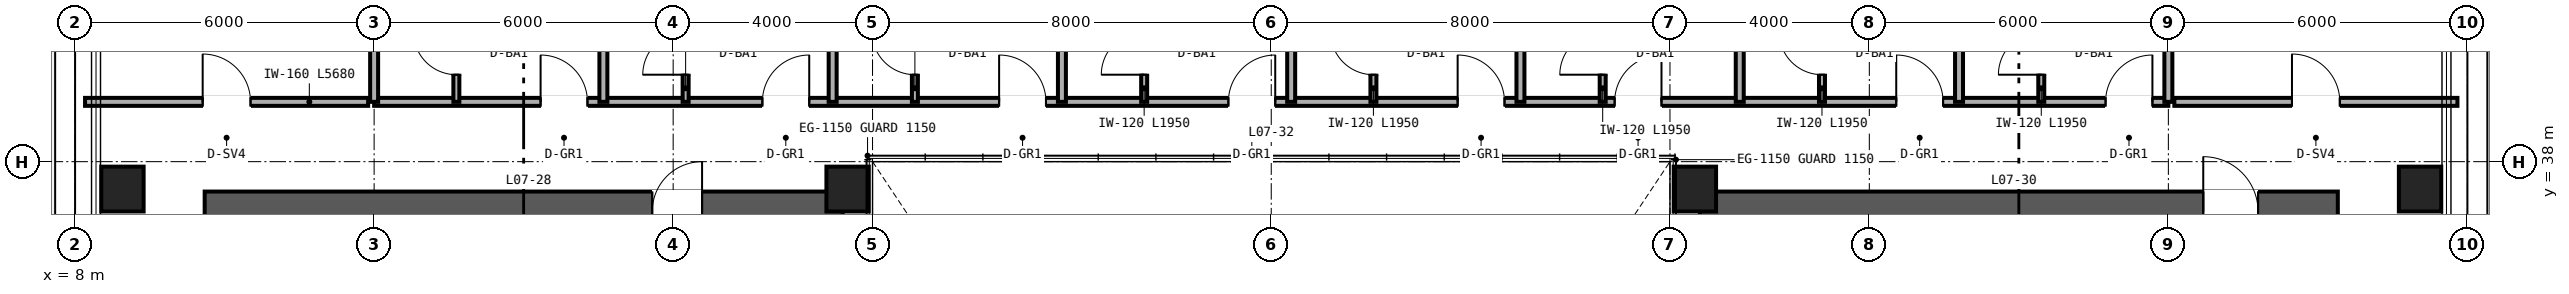
"""IFC4 building model, lengths in metres.
Left out: names, types, materials, properties, quantities, classifications, styles, units other than length and angle.
Written with IfcOpenShell. Run it as: python <this file> out.ifc"""

import sys

from ifc_helpers import new_model, si_unit, direction, frame, frame_2d, origin, origin_2d, place, context, subcontext, project, spatial, rectangle, hollow_rectangle, extrude, source, transform, mapped, element, fill, save


model = new_model("IFC4")
c1 = context("Model", 3, precision=1e-05, world=origin(), true_north=direction((0.0, 1.0)))
c2 = subcontext(c1, "Body", "Model", "MODEL_VIEW")
j1 = project(units=[si_unit("LENGTHUNIT", "METRE"), si_unit("PLANEANGLEUNIT", "RADIAN")], contexts=[c1])
p1 = place(None, origin())
s1 = spatial("IfcSite", under=j1, at=p1, CompositionType="ELEMENT")
p2 = place(p1, origin())
s2 = spatial("IfcBuilding", under=s1, at=p2, CompositionType="ELEMENT")
p3 = place(p2, frame((0.0, 0.0, 34.8)))
s3 = spatial("IfcBuildingStorey", under=s2, at=p3, CompositionType="ELEMENT", Elevation=34.8)
p4 = place(p3, frame((10.6, 37.0, 0.0), z_axis=(0.0, 0.0, 1.0), x_axis=(1.0, 0.0, 0.0)))
e1 = element("IfcWall", 1, at=p4, inside=s3, PredefinedType="SHEAR", context=c2, shape_type="SweptSolid", body=[
    extrude(rectangle(XDim=12.8, YDim=0.8, at=frame_2d((6.4, 0.0))), origin(), (0.0, 0.0, 1.0), 3.35),
])
p5 = place(p4, frame((8.98, 0.0, 0.0)))
e2 = element("IfcOpeningElement", 2, at=p5, cuts=e1, PredefinedType="OPENING", context=c2, shape_type="SweptSolid", body=[
    extrude(rectangle(XDim=1.0, YDim=2.15, at=frame_2d((0.5, 1.075))), frame((0.0, 0.41, 0.0), z_axis=(0.0, -1.0, 0.0), x_axis=(1.0, 0.0, 0.0)), (0.0, 0.0, 1.0), 0.82),
])
p6 = place(p3, frame((40.6, 37.0, 0.0), z_axis=(0.0, 0.0, 1.0), x_axis=(1.0, 0.0, 0.0)))
e3 = element("IfcWall", 3, at=p6, inside=s3, PredefinedType="SHEAR", context=c2, shape_type="SweptSolid", body=[
    extrude(rectangle(XDim=12.8, YDim=0.8, at=frame_2d((6.4, 0.0))), origin(), (0.0, 0.0, 1.0), 3.35),
])
p7 = place(p6, frame((10.1, 0.0, 0.0)))
e4 = element("IfcOpeningElement", 4, at=p7, cuts=e3, PredefinedType="OPENING", context=c2, shape_type="SweptSolid", body=[
    extrude(rectangle(XDim=1.1, YDim=2.15, at=frame_2d((0.55, 1.075))), frame((0.0, 0.41, 0.0), z_axis=(0.0, -1.0, 0.0), x_axis=(1.0, 0.0, 0.0)), (0.0, 0.0, 1.0), 0.82),
])
m1 = source(origin(), c2, "Body", "SweptSolid", [
    extrude(hollow_rectangle(XDim=0.85, YDim=0.9, WallThickness=0.04, at=origin_2d()), origin(), (0.0, 0.0, 1.0), 3.35),
])
for number, where, z_axis, x_axis in (
    (5, (8.95, 37.45, 0.0), (0.0, 0.0, 1.0), (1.0, 0.0, 0.0)),
    (6, (23.5, 37.45, 0.0), (0.0, 0.0, 1.0), (1.0, 0.0, 0.0)),
    (7, (40.5, 37.45, 0.0), (0.0, 0.0, 1.0), (1.0, 0.0, 0.0)),
    (8, (55.05, 37.45, 0.0), (0.0, 0.0, 1.0), (1.0, 0.0, 0.0)),
):
    element("IfcColumn", number, at=place(p3, frame(where, z_axis=z_axis, x_axis=x_axis)), inside=s3, PredefinedType="COLUMN", context=c2, shape_type="MappedRepresentation", body=[
        mapped(m1, transform((0.0, 0.0, 0.0), scale=1.0)),
    ])
p8 = place(p3, frame((8.2, 39.2, 0.0), z_axis=(0.0, 0.0, 1.0), x_axis=(1.0, 0.0, 0.0)))
e9 = element("IfcWall", 9, at=p8, inside=s3, PredefinedType="PARTITIONING", context=c2, shape_type="SweptSolid", body=[
    extrude(rectangle(XDim=5.68, YDim=0.16, at=frame_2d((2.84, 0.0))), origin(), (0.0, 0.0, 1.0), 3.35),
])
p9 = place(p8, frame((2.36, 0.0, 0.0)))
e10 = element("IfcOpeningElement", 10, at=p9, cuts=e9, PredefinedType="OPENING", context=c2, shape_type="SweptSolid", body=[
    extrude(rectangle(XDim=0.96, YDim=2.15, at=frame_2d((0.48, 1.075))), frame((0.0, 0.09, 0.0), z_axis=(0.0, -1.0, 0.0), x_axis=(1.0, 0.0, 0.0)), (0.0, 0.0, 1.0), 0.18),
])
p10 = place(p3, frame((50.12, 39.2, 0.0), z_axis=(0.0, 0.0, 1.0), x_axis=(1.0, 0.0, 0.0)))
e11 = element("IfcWall", 11, at=p10, inside=s3, PredefinedType="PARTITIONING", context=c2, shape_type="SweptSolid", body=[
    extrude(rectangle(XDim=5.68, YDim=0.16, at=frame_2d((2.84, 0.0))), origin(), (0.0, 0.0, 1.0), 3.35),
])
p11 = place(p10, frame((2.36, 0.0, 0.0)))
e12 = element("IfcOpeningElement", 12, at=p11, cuts=e11, PredefinedType="OPENING", context=c2, shape_type="SweptSolid", body=[
    extrude(rectangle(XDim=0.96, YDim=2.15, at=frame_2d((0.48, 1.075))), frame((0.0, 0.09, 0.0), z_axis=(0.0, -1.0, 0.0), x_axis=(1.0, 0.0, 0.0)), (0.0, 0.0, 1.0), 0.18),
])
p12 = place(p3, frame((14.0, 39.2, 0.0), z_axis=(0.0, 0.0, 1.0), x_axis=(1.0, 0.0, 0.0)))
e13 = element("IfcWall", 13, at=p12, inside=s3, PredefinedType="PARTITIONING", context=c2, shape_type="SweptSolid", body=[
    extrude(rectangle(XDim=36.0, YDim=0.16, at=frame_2d((18.0, 0.0))), origin(), (0.0, 0.0, 1.0), 2.571),
])
p13 = place(p12, frame((3.34, 0.0, 0.0)))
e14 = element("IfcOpeningElement", 14, at=p13, cuts=e13, PredefinedType="OPENING", context=c2, shape_type="SweptSolid", body=[
    extrude(rectangle(XDim=0.94, YDim=2.15, at=frame_2d((0.47, 1.075))), frame((0.0, 0.09, 0.0), z_axis=(0.0, -1.0, 0.0), x_axis=(1.0, 0.0, 0.0)), (0.0, 0.0, 1.0), 0.18),
])
p14 = place(p12, frame((7.79, 0.0, 0.0)))
e15 = element("IfcOpeningElement", 15, at=p14, cuts=e13, PredefinedType="OPENING", context=c2, shape_type="SweptSolid", body=[
    extrude(rectangle(XDim=0.94, YDim=2.15, at=frame_2d((0.47, 1.075))), frame((0.0, 0.09, 0.0), z_axis=(0.0, -1.0, 0.0), x_axis=(1.0, 0.0, 0.0)), (0.0, 0.0, 1.0), 0.18),
])
p15 = place(p12, frame((12.54, 0.0, 0.0)))
e16 = element("IfcOpeningElement", 16, at=p15, cuts=e13, PredefinedType="OPENING", context=c2, shape_type="SweptSolid", body=[
    extrude(rectangle(XDim=0.94, YDim=2.15, at=frame_2d((0.47, 1.075))), frame((0.0, 0.09, 0.0), z_axis=(0.0, -1.0, 0.0), x_axis=(1.0, 0.0, 0.0)), (0.0, 0.0, 1.0), 0.18),
])
p16 = place(p12, frame((17.14, 0.0, 0.0)))
e17 = element("IfcOpeningElement", 17, at=p16, cuts=e13, PredefinedType="OPENING", context=c2, shape_type="SweptSolid", body=[
    extrude(rectangle(XDim=0.94, YDim=2.15, at=frame_2d((0.47, 1.075))), frame((0.0, 0.09, 0.0), z_axis=(0.0, -1.0, 0.0), x_axis=(1.0, 0.0, 0.0)), (0.0, 0.0, 1.0), 0.18),
])
p17 = place(p12, frame((21.74, 0.0, 0.0)))
e18 = element("IfcOpeningElement", 18, at=p17, cuts=e13, PredefinedType="OPENING", context=c2, shape_type="SweptSolid", body=[
    extrude(rectangle(XDim=0.94, YDim=2.15, at=frame_2d((0.47, 1.075))), frame((0.0, 0.09, 0.0), z_axis=(0.0, -1.0, 0.0), x_axis=(1.0, 0.0, 0.0)), (0.0, 0.0, 1.0), 0.18),
])
p18 = place(p12, frame((24.89, 0.0, 0.0)))
e19 = element("IfcOpeningElement", 19, at=p18, cuts=e13, PredefinedType="OPENING", context=c2, shape_type="SweptSolid", body=[
    extrude(rectangle(XDim=0.94, YDim=2.15, at=frame_2d((0.47, 1.075))), frame((0.0, 0.09, 0.0), z_axis=(0.0, -1.0, 0.0), x_axis=(1.0, 0.0, 0.0)), (0.0, 0.0, 1.0), 0.18),
])
p19 = place(p12, frame((30.54, 0.0, 0.0)))
e20 = element("IfcOpeningElement", 20, at=p19, cuts=e13, PredefinedType="OPENING", context=c2, shape_type="SweptSolid", body=[
    extrude(rectangle(XDim=0.94, YDim=2.15, at=frame_2d((0.47, 1.075))), frame((0.0, 0.09, 0.0), z_axis=(0.0, -1.0, 0.0), x_axis=(1.0, 0.0, 0.0)), (0.0, 0.0, 1.0), 0.18),
])
p20 = place(p12, frame((34.74, 0.0, 0.0)))
e21 = element("IfcOpeningElement", 21, at=p20, cuts=e13, PredefinedType="OPENING", context=c2, shape_type="SweptSolid", body=[
    extrude(rectangle(XDim=0.94, YDim=2.15, at=frame_2d((0.47, 1.075))), frame((0.0, 0.09, 0.0), z_axis=(0.0, -1.0, 0.0), x_axis=(1.0, 0.0, 0.0)), (0.0, 0.0, 1.0), 0.18),
])
for number, where, z_axis, x_axis in (
    (22, (14.0, 39.2, 0.0), (0.0, 0.0, 1.0), (0.0, 1.0, 0.0)),
    (23, (50.0, 39.2, 0.0), (0.0, 0.0, 1.0), (0.0, 1.0, 0.0)),
    (24, (18.6, 39.2, 0.0), (0.0, 0.0, 1.0), (0.0, 1.0, 0.0)),
):
    element("IfcWall", number, at=place(p3, frame(where, z_axis=z_axis, x_axis=x_axis)), inside=s3, PredefinedType="PARTITIONING", context=c2, shape_type="SweptSolid", body=[
        extrude(rectangle(XDim=10.44, YDim=0.16, at=frame_2d((5.22, 0.0))), origin(), (0.0, 0.0, 1.0), 2.657),
    ])
p21 = place(p3, frame((15.65, 39.2, 0.0), z_axis=(0.0, 0.0, 1.0), x_axis=(0.0, 1.0, 0.0)))
e25 = element("IfcWall", 25, at=p21, inside=s3, PredefinedType="PARTITIONING", context=c2, shape_type="SweptSolid", body=[
    extrude(rectangle(XDim=1.95, YDim=0.12, at=frame_2d((0.975, 0.0))), origin(), (0.0, 0.0, 1.0), 3.35),
])
p22 = place(p21, frame((0.545, 0.0, 0.0)))
e26 = element("IfcOpeningElement", 26, at=p22, cuts=e25, PredefinedType="OPENING", context=c2, shape_type="SweptSolid", body=[
    extrude(rectangle(XDim=0.86, YDim=2.1, at=frame_2d((0.43, 1.05))), frame((0.0, 0.07, 0.0), z_axis=(0.0, -1.0, 0.0), x_axis=(1.0, 0.0, 0.0)), (0.0, 0.0, 1.0), 0.14),
])
p23 = place(p3, frame((23.2, 39.2, 0.0), z_axis=(0.0, 0.0, 1.0), x_axis=(0.0, 1.0, 0.0)))
e27 = element("IfcWall", 27, at=p23, inside=s3, PredefinedType="PARTITIONING", context=c2, shape_type="SweptSolid", body=[
    extrude(rectangle(XDim=10.44, YDim=0.16, at=frame_2d((5.22, 0.0))), origin(), (0.0, 0.0, 1.0), 2.813),
])
p24 = place(p3, frame((20.25, 39.2, 0.0), z_axis=(0.0, 0.0, 1.0), x_axis=(0.0, 1.0, 0.0)))
e28 = element("IfcWall", 28, at=p24, inside=s3, PredefinedType="PARTITIONING", context=c2, shape_type="SweptSolid", body=[
    extrude(rectangle(XDim=1.95, YDim=0.12, at=frame_2d((0.975, 0.0))), origin(), (0.0, 0.0, 1.0), 3.35),
])
p25 = place(p24, frame((0.545, 0.0, 0.0)))
e29 = element("IfcOpeningElement", 29, at=p25, cuts=e28, PredefinedType="OPENING", context=c2, shape_type="SweptSolid", body=[
    extrude(rectangle(XDim=0.86, YDim=2.1, at=frame_2d((0.43, 1.05))), frame((0.0, 0.07, 0.0), z_axis=(0.0, -1.0, 0.0), x_axis=(1.0, 0.0, 0.0)), (0.0, 0.0, 1.0), 0.14),
])
p26 = place(p3, frame((27.8, 39.2, 0.0), z_axis=(0.0, 0.0, 1.0), x_axis=(0.0, 1.0, 0.0)))
e30 = element("IfcWall", 30, at=p26, inside=s3, PredefinedType="PARTITIONING", context=c2, shape_type="SweptSolid", body=[
    extrude(rectangle(XDim=10.44, YDim=0.16, at=frame_2d((5.22, 0.0))), origin(), (0.0, 0.0, 1.0), 2.423),
])
p27 = place(p3, frame((24.85, 39.2, 0.0), z_axis=(0.0, 0.0, 1.0), x_axis=(0.0, 1.0, 0.0)))
e31 = element("IfcWall", 31, at=p27, inside=s3, PredefinedType="PARTITIONING", context=c2, shape_type="SweptSolid", body=[
    extrude(rectangle(XDim=1.95, YDim=0.12, at=frame_2d((0.975, 0.0))), origin(), (0.0, 0.0, 1.0), 3.35),
])
p28 = place(p27, frame((0.545, 0.0, 0.0)))
e32 = element("IfcOpeningElement", 32, at=p28, cuts=e31, PredefinedType="OPENING", context=c2, shape_type="SweptSolid", body=[
    extrude(rectangle(XDim=0.86, YDim=2.1, at=frame_2d((0.43, 1.05))), frame((0.0, 0.07, 0.0), z_axis=(0.0, -1.0, 0.0), x_axis=(1.0, 0.0, 0.0)), (0.0, 0.0, 1.0), 0.14),
])
p29 = place(p3, frame((32.4, 39.2, 0.0), z_axis=(0.0, 0.0, 1.0), x_axis=(0.0, 1.0, 0.0)))
e33 = element("IfcWall", 33, at=p29, inside=s3, PredefinedType="PARTITIONING", context=c2, shape_type="SweptSolid", body=[
    extrude(rectangle(XDim=10.44, YDim=0.16, at=frame_2d((5.22, 0.0))), origin(), (0.0, 0.0, 1.0), 2.423),
])
p30 = place(p3, frame((29.45, 39.2, 0.0), z_axis=(0.0, 0.0, 1.0), x_axis=(0.0, 1.0, 0.0)))
e34 = element("IfcWall", 34, at=p30, inside=s3, PredefinedType="PARTITIONING", context=c2, shape_type="SweptSolid", body=[
    extrude(rectangle(XDim=1.95, YDim=0.12, at=frame_2d((0.975, 0.0))), origin(), (0.0, 0.0, 1.0), 3.35),
])
p31 = place(p30, frame((0.545, 0.0, 0.0)))
e35 = element("IfcOpeningElement", 35, at=p31, cuts=e34, PredefinedType="OPENING", context=c2, shape_type="SweptSolid", body=[
    extrude(rectangle(XDim=0.86, YDim=2.1, at=frame_2d((0.43, 1.05))), frame((0.0, 0.07, 0.0), z_axis=(0.0, -1.0, 0.0), x_axis=(1.0, 0.0, 0.0)), (0.0, 0.0, 1.0), 0.14),
])
p32 = place(p3, frame((37.0, 39.2, 0.0), z_axis=(0.0, 0.0, 1.0), x_axis=(0.0, 1.0, 0.0)))
e36 = element("IfcWall", 36, at=p32, inside=s3, PredefinedType="PARTITIONING", context=c2, shape_type="SweptSolid", body=[
    extrude(rectangle(XDim=10.44, YDim=0.16, at=frame_2d((5.22, 0.0))), origin(), (0.0, 0.0, 1.0), 2.423),
])
p33 = place(p3, frame((34.05, 39.2, 0.0), z_axis=(0.0, 0.0, 1.0), x_axis=(0.0, 1.0, 0.0)))
e37 = element("IfcWall", 37, at=p33, inside=s3, PredefinedType="PARTITIONING", context=c2, shape_type="SweptSolid", body=[
    extrude(rectangle(XDim=1.95, YDim=0.12, at=frame_2d((0.975, 0.0))), origin(), (0.0, 0.0, 1.0), 3.35),
])
p34 = place(p33, frame((0.545, 0.0, 0.0)))
e38 = element("IfcOpeningElement", 38, at=p34, cuts=e37, PredefinedType="OPENING", context=c2, shape_type="SweptSolid", body=[
    extrude(rectangle(XDim=0.86, YDim=2.1, at=frame_2d((0.43, 1.05))), frame((0.0, 0.07, 0.0), z_axis=(0.0, -1.0, 0.0), x_axis=(1.0, 0.0, 0.0)), (0.0, 0.0, 1.0), 0.14),
])
p35 = place(p3, frame((41.4, 39.2, 0.0), z_axis=(0.0, 0.0, 1.0), x_axis=(0.0, 1.0, 0.0)))
e39 = element("IfcWall", 39, at=p35, inside=s3, PredefinedType="PARTITIONING", context=c2, shape_type="SweptSolid", body=[
    extrude(rectangle(XDim=10.44, YDim=0.16, at=frame_2d((5.22, 0.0))), origin(), (0.0, 0.0, 1.0), 2.813),
])
p36 = place(p3, frame((38.65, 39.2, 0.0), z_axis=(0.0, 0.0, 1.0), x_axis=(0.0, 1.0, 0.0)))
e40 = element("IfcWall", 40, at=p36, inside=s3, PredefinedType="PARTITIONING", context=c2, shape_type="SweptSolid", body=[
    extrude(rectangle(XDim=1.95, YDim=0.12, at=frame_2d((0.975, 0.0))), origin(), (0.0, 0.0, 1.0), 3.35),
])
p37 = place(p36, frame((0.545, 0.0, 0.0)))
e41 = element("IfcOpeningElement", 41, at=p37, cuts=e40, PredefinedType="OPENING", context=c2, shape_type="SweptSolid", body=[
    extrude(rectangle(XDim=0.86, YDim=2.1, at=frame_2d((0.43, 1.05))), frame((0.0, 0.07, 0.0), z_axis=(0.0, -1.0, 0.0), x_axis=(1.0, 0.0, 0.0)), (0.0, 0.0, 1.0), 0.14),
])
p38 = place(p3, frame((45.8, 39.2, 0.0), z_axis=(0.0, 0.0, 1.0), x_axis=(0.0, 1.0, 0.0)))
e42 = element("IfcWall", 42, at=p38, inside=s3, PredefinedType="PARTITIONING", context=c2, shape_type="SweptSolid", body=[
    extrude(rectangle(XDim=10.44, YDim=0.16, at=frame_2d((5.22, 0.0))), origin(), (0.0, 0.0, 1.0), 2.657),
])
p39 = place(p3, frame((43.05, 39.2, 0.0), z_axis=(0.0, 0.0, 1.0), x_axis=(0.0, 1.0, 0.0)))
e43 = element("IfcWall", 43, at=p39, inside=s3, PredefinedType="PARTITIONING", context=c2, shape_type="SweptSolid", body=[
    extrude(rectangle(XDim=1.95, YDim=0.12, at=frame_2d((0.975, 0.0))), origin(), (0.0, 0.0, 1.0), 3.35),
])
p40 = place(p39, frame((0.545, 0.0, 0.0)))
e44 = element("IfcOpeningElement", 44, at=p40, cuts=e43, PredefinedType="OPENING", context=c2, shape_type="SweptSolid", body=[
    extrude(rectangle(XDim=0.86, YDim=2.1, at=frame_2d((0.43, 1.05))), frame((0.0, 0.07, 0.0), z_axis=(0.0, -1.0, 0.0), x_axis=(1.0, 0.0, 0.0)), (0.0, 0.0, 1.0), 0.14),
])
p41 = place(p3, frame((47.45, 39.2, 0.0), z_axis=(0.0, 0.0, 1.0), x_axis=(0.0, 1.0, 0.0)))
e45 = element("IfcWall", 45, at=p41, inside=s3, PredefinedType="PARTITIONING", context=c2, shape_type="SweptSolid", body=[
    extrude(rectangle(XDim=1.95, YDim=0.12, at=frame_2d((0.975, 0.0))), origin(), (0.0, 0.0, 1.0), 3.35),
])
p42 = place(p41, frame((0.545, 0.0, 0.0)))
e46 = element("IfcOpeningElement", 46, at=p42, cuts=e45, PredefinedType="OPENING", context=c2, shape_type="SweptSolid", body=[
    extrude(rectangle(XDim=0.86, YDim=2.1, at=frame_2d((0.43, 1.05))), frame((0.0, 0.07, 0.0), z_axis=(0.0, -1.0, 0.0), x_axis=(1.0, 0.0, 0.0)), (0.0, 0.0, 1.0), 0.14),
])
m2 = source(origin(), c2, "Body", "SweptSolid", [
    extrude(rectangle(XDim=1.0, YDim=2.15, at=frame_2d((0.5, 1.075))), frame((0.0, 0.025, 0.0), z_axis=(0.0, -1.0, 0.0), x_axis=(1.0, 0.0, 0.0)), (0.0, 0.0, 1.0), 0.05),
])
p43 = place(p5, origin())
e47 = element("IfcDoor", 47, at=p43, inside=s3, OperationType="SINGLE_SWING_RIGHT", PredefinedType="DOOR", context=c2, shape_type="MappedRepresentation", body=[
    mapped(m2, transform((0.0, 0.0, 0.0), scale=1.0)),
])
fill(e2, e47)
m3 = source(origin(), c2, "Body", "SweptSolid", [
    extrude(rectangle(XDim=1.1, YDim=2.15, at=frame_2d((0.55, 1.075))), frame((0.0, 0.025, 0.0), z_axis=(0.0, -1.0, 0.0), x_axis=(1.0, 0.0, 0.0)), (0.0, 0.0, 1.0), 0.05),
])
p44 = place(p7, origin())
e48 = element("IfcDoor", 48, at=p44, inside=s3, OperationType="SINGLE_SWING_LEFT", PredefinedType="DOOR", context=c2, shape_type="MappedRepresentation", body=[
    mapped(m3, transform((0.0, 0.0, 0.0), scale=1.0)),
])
fill(e4, e48)
m4 = source(origin(), c2, "Body", "SweptSolid", [
    extrude(rectangle(XDim=0.96, YDim=2.15, at=frame_2d((0.48, 1.075))), frame((0.0, 0.025, 0.0), z_axis=(0.0, -1.0, 0.0), x_axis=(1.0, 0.0, 0.0)), (0.0, 0.0, 1.0), 0.05),
])
p45 = place(p9, origin())
e49 = element("IfcDoor", 49, at=p45, inside=s3, OperationType="SINGLE_SWING_LEFT", PredefinedType="DOOR", context=c2, shape_type="MappedRepresentation", body=[
    mapped(m4, transform((0.0, 0.0, 0.0), scale=1.0)),
])
fill(e10, e49)
p46 = place(p11, origin())
e50 = element("IfcDoor", 50, at=p46, inside=s3, OperationType="SINGLE_SWING_LEFT", PredefinedType="DOOR", context=c2, shape_type="MappedRepresentation", body=[
    mapped(m4, transform((0.0, 0.0, 0.0), scale=1.0)),
])
fill(e12, e50)
m5 = source(origin(), c2, "Body", "SweptSolid", [
    extrude(rectangle(XDim=0.86, YDim=2.1, at=frame_2d((0.43, 1.05))), frame((0.0, 0.025, 0.0), z_axis=(0.0, -1.0, 0.0), x_axis=(1.0, 0.0, 0.0)), (0.0, 0.0, 1.0), 0.05),
])
p47 = place(p22, origin())
e51 = element("IfcDoor", 51, at=p47, inside=s3, OperationType="SINGLE_SWING_RIGHT", PredefinedType="DOOR", context=c2, shape_type="MappedRepresentation", body=[
    mapped(m5, transform((0.0, 0.0, 0.0), scale=1.0)),
])
fill(e26, e51)
p48 = place(p25, origin())
e52 = element("IfcDoor", 52, at=p48, inside=s3, OperationType="SINGLE_SWING_LEFT", PredefinedType="DOOR", context=c2, shape_type="MappedRepresentation", body=[
    mapped(m5, transform((0.0, 0.0, 0.0), scale=1.0)),
])
fill(e29, e52)
p49 = place(p28, origin())
e53 = element("IfcDoor", 53, at=p49, inside=s3, OperationType="SINGLE_SWING_RIGHT", PredefinedType="DOOR", context=c2, shape_type="MappedRepresentation", body=[
    mapped(m5, transform((0.0, 0.0, 0.0), scale=1.0)),
])
fill(e32, e53)
p50 = place(p31, origin())
e54 = element("IfcDoor", 54, at=p50, inside=s3, OperationType="SINGLE_SWING_LEFT", PredefinedType="DOOR", context=c2, shape_type="MappedRepresentation", body=[
    mapped(m5, transform((0.0, 0.0, 0.0), scale=1.0)),
])
fill(e35, e54)
p51 = place(p34, origin())
e55 = element("IfcDoor", 55, at=p51, inside=s3, OperationType="SINGLE_SWING_RIGHT", PredefinedType="DOOR", context=c2, shape_type="MappedRepresentation", body=[
    mapped(m5, transform((0.0, 0.0, 0.0), scale=1.0)),
])
fill(e38, e55)
p52 = place(p37, origin())
e56 = element("IfcDoor", 56, at=p52, inside=s3, OperationType="SINGLE_SWING_LEFT", PredefinedType="DOOR", context=c2, shape_type="MappedRepresentation", body=[
    mapped(m5, transform((0.0, 0.0, 0.0), scale=1.0)),
])
fill(e41, e56)
p53 = place(p40, origin())
e57 = element("IfcDoor", 57, at=p53, inside=s3, OperationType="SINGLE_SWING_RIGHT", PredefinedType="DOOR", context=c2, shape_type="MappedRepresentation", body=[
    mapped(m5, transform((0.0, 0.0, 0.0), scale=1.0)),
])
fill(e44, e57)
p54 = place(p42, origin())
e58 = element("IfcDoor", 58, at=p54, inside=s3, OperationType="SINGLE_SWING_LEFT", PredefinedType="DOOR", context=c2, shape_type="MappedRepresentation", body=[
    mapped(m5, transform((0.0, 0.0, 0.0), scale=1.0)),
])
fill(e46, e58)
m6 = source(origin(), c2, "Body", "SweptSolid", [
    extrude(rectangle(XDim=0.94, YDim=2.15, at=frame_2d((0.47, 1.075))), frame((0.0, 0.025, 0.0), z_axis=(0.0, -1.0, 0.0), x_axis=(1.0, 0.0, 0.0)), (0.0, 0.0, 1.0), 0.05),
])
p55 = place(p13, origin())
e59 = element("IfcDoor", 59, at=p55, inside=s3, OperationType="SINGLE_SWING_LEFT", PredefinedType="DOOR", context=c2, shape_type="MappedRepresentation", body=[
    mapped(m6, transform((0.0, 0.0, 0.0), scale=1.0)),
])
fill(e14, e59)
p56 = place(p14, origin())
e60 = element("IfcDoor", 60, at=p56, inside=s3, OperationType="SINGLE_SWING_RIGHT", PredefinedType="DOOR", context=c2, shape_type="MappedRepresentation", body=[
    mapped(m6, transform((0.0, 0.0, 0.0), scale=1.0)),
])
fill(e15, e60)
p57 = place(p15, origin())
e61 = element("IfcDoor", 61, at=p57, inside=s3, OperationType="SINGLE_SWING_LEFT", PredefinedType="DOOR", context=c2, shape_type="MappedRepresentation", body=[
    mapped(m6, transform((0.0, 0.0, 0.0), scale=1.0)),
])
fill(e16, e61)
p58 = place(p16, origin())
e62 = element("IfcDoor", 62, at=p58, inside=s3, OperationType="SINGLE_SWING_RIGHT", PredefinedType="DOOR", context=c2, shape_type="MappedRepresentation", body=[
    mapped(m6, transform((0.0, 0.0, 0.0), scale=1.0)),
])
fill(e17, e62)
p59 = place(p17, origin())
e63 = element("IfcDoor", 63, at=p59, inside=s3, OperationType="SINGLE_SWING_LEFT", PredefinedType="DOOR", context=c2, shape_type="MappedRepresentation", body=[
    mapped(m6, transform((0.0, 0.0, 0.0), scale=1.0)),
])
fill(e18, e63)
p60 = place(p18, origin())
e64 = element("IfcDoor", 64, at=p60, inside=s3, OperationType="SINGLE_SWING_RIGHT", PredefinedType="DOOR", context=c2, shape_type="MappedRepresentation", body=[
    mapped(m6, transform((0.0, 0.0, 0.0), scale=1.0)),
])
fill(e19, e64)
p61 = place(p19, origin())
e65 = element("IfcDoor", 65, at=p61, inside=s3, OperationType="SINGLE_SWING_LEFT", PredefinedType="DOOR", context=c2, shape_type="MappedRepresentation", body=[
    mapped(m6, transform((0.0, 0.0, 0.0), scale=1.0)),
])
fill(e20, e65)
p62 = place(p20, origin())
e66 = element("IfcDoor", 66, at=p62, inside=s3, OperationType="SINGLE_SWING_RIGHT", PredefinedType="DOOR", context=c2, shape_type="MappedRepresentation", body=[
    mapped(m6, transform((0.0, 0.0, 0.0), scale=1.0)),
])
fill(e21, e66)
save(model, sys.argv[1])
